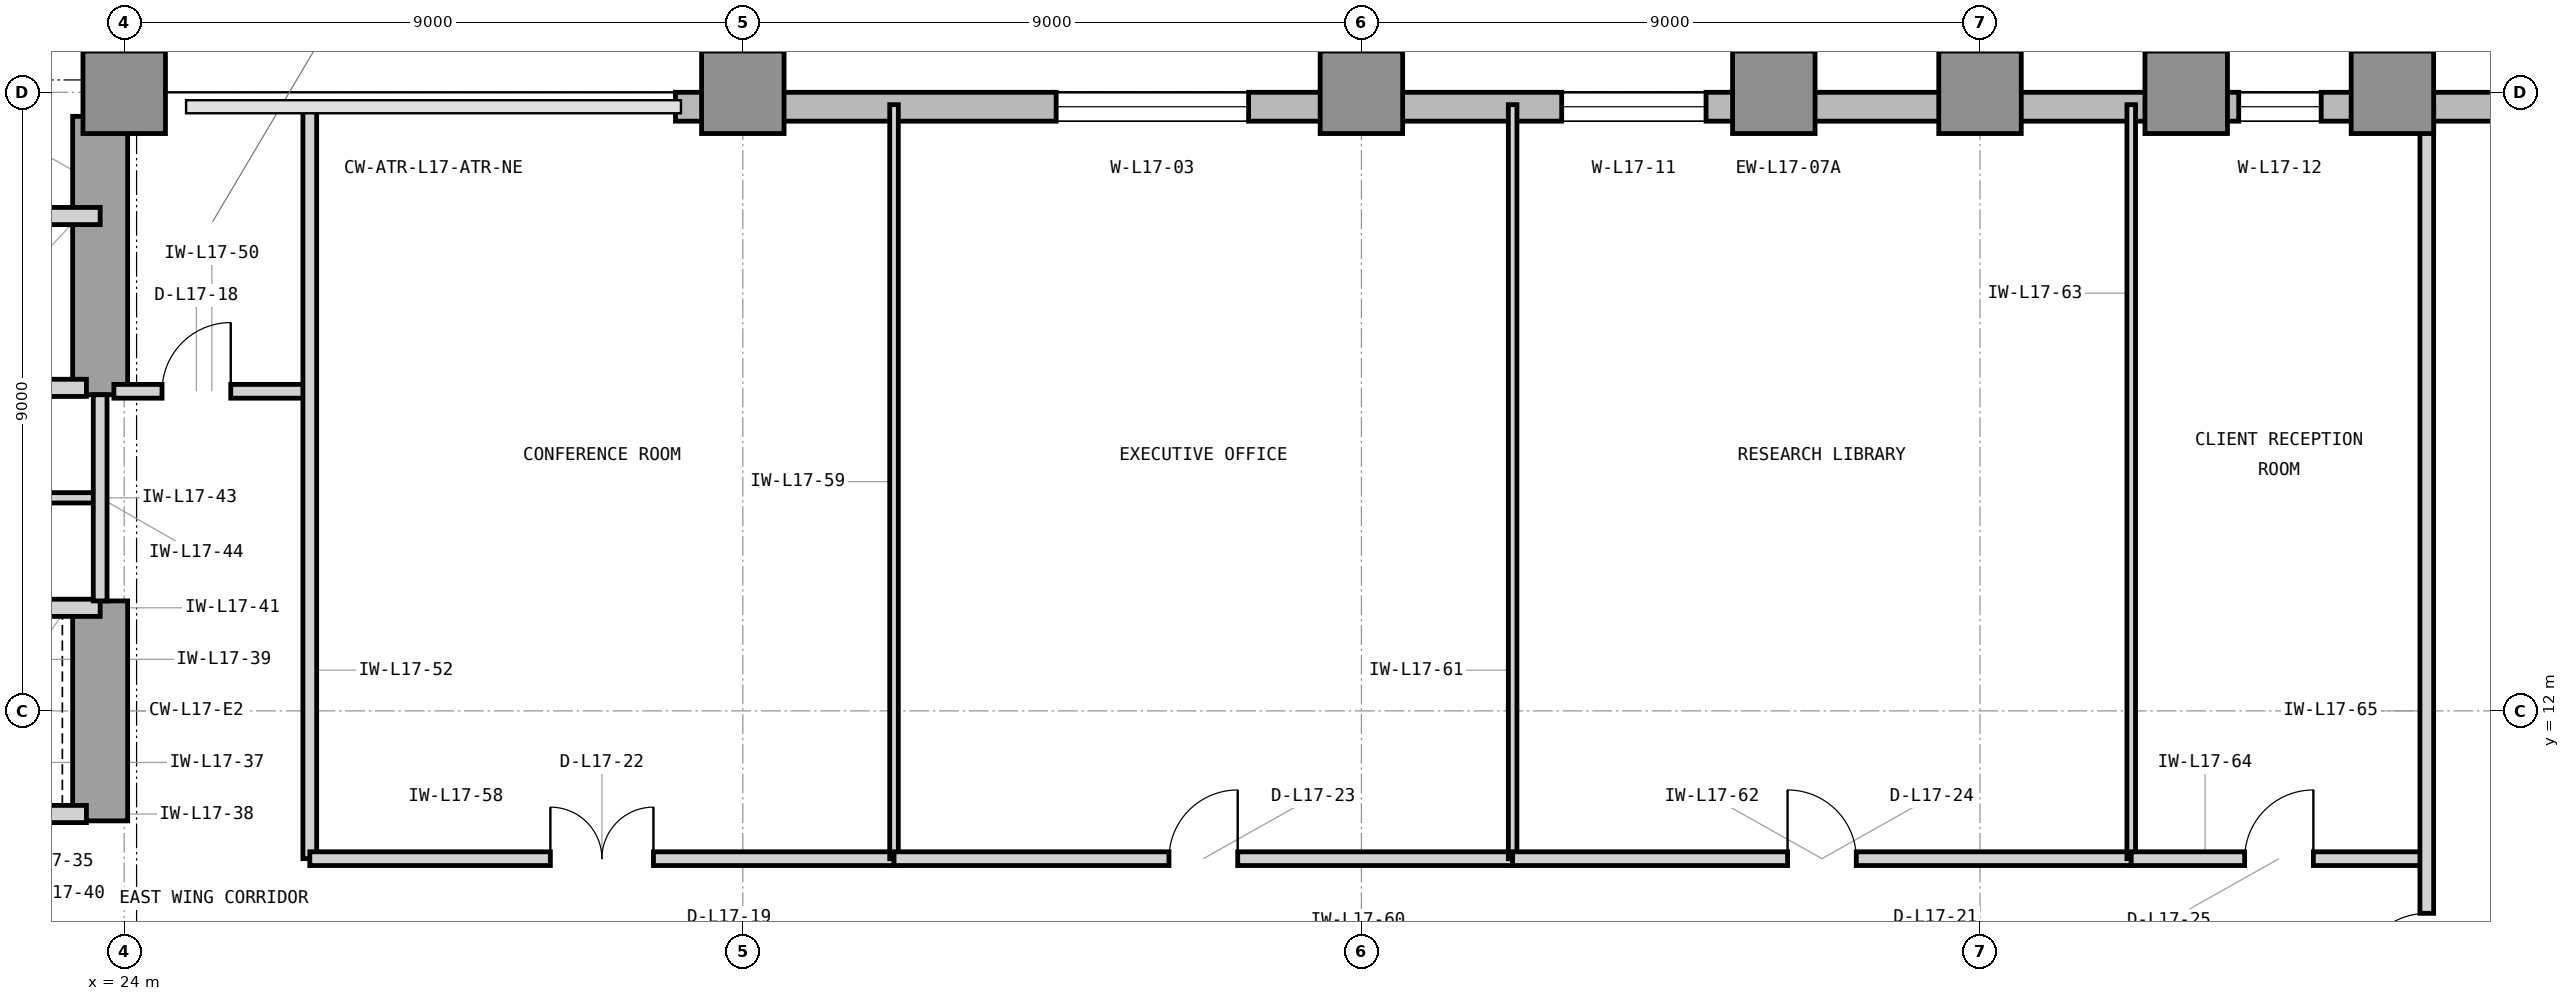
"""IFC4 building model, lengths in metres.
Left out: names, types, materials, properties, quantities, classifications, styles, units other than length and angle.
Written with IfcOpenShell. Run it as: python <this file> out.ifc"""

import sys

from ifc_helpers import new_model, si_unit, direction, frame, frame_2d, origin, origin_2d, place, context, subcontext, project, spatial, rectangle, extrude, element, fill, save


model = new_model("IFC4")
c1 = context("Model", 3, precision=1e-05, world=origin(), true_north=direction((0.0, 1.0)))
c2 = subcontext(c1, "Body", "Model", "MODEL_VIEW")
j1 = project(units=[si_unit("LENGTHUNIT", "METRE"), si_unit("PLANEANGLEUNIT", "RADIAN")], contexts=[c1])
p1 = place(None, origin())
s1 = spatial("IfcSite", under=j1, at=p1, CompositionType="ELEMENT")
p2 = place(p1, origin())
s2 = spatial("IfcBuilding", under=s1, at=p2, CompositionType="ELEMENT")
p3 = place(p2, frame((0.0, 0.0, 76.2)))
s3 = spatial("IfcBuildingStorey", under=s2, at=p3, CompositionType="ELEMENT", Elevation=76.2)
p4 = place(p3, frame((23.65, 10.4, 0.0), z_axis=(0.0, 0.0, 1.0), x_axis=(0.0, 1.0, 0.0)))
e1 = element("IfcWall", 1, at=p4, inside=s3, PredefinedType="SHEAR", context=c2, shape_type="SweptSolid", body=[
    extrude(rectangle(XDim=3.2, YDim=0.8, at=frame_2d((1.6, 0.0))), origin(), (0.0, 0.0, 1.0), 4.2),
])
p5 = place(p3, frame((23.65, 16.6, 0.0), z_axis=(0.0, 0.0, 1.0), x_axis=(0.0, 1.0, 0.0)))
e2 = element("IfcWall", 2, at=p5, inside=s3, PredefinedType="SHEAR", context=c2, shape_type="SweptSolid", body=[
    extrude(rectangle(XDim=4.05, YDim=0.8, at=frame_2d((2.025, 0.0))), origin(), (0.0, 0.0, 1.0), 4.2),
])
for number, where, z_axis, x_axis in (
    (3, (24.0, 21.0, 0.0), (0.0, 0.0, 1.0), (1.0, 0.0, 0.0)),
    (4, (33.0, 21.0, 0.0), (0.0, 0.0, 1.0), (1.0, 0.0, 0.0)),
    (5, (42.0, 21.0, 0.0), (0.0, 0.0, 1.0), (1.0, 0.0, 0.0)),
    (6, (48.0, 21.0, 0.0), (0.0, 0.0, 1.0), (1.0, 0.0, 0.0)),
    (7, (51.0, 21.0, 0.0), (0.0, 0.0, 1.0), (1.0, 0.0, 0.0)),
    (8, (54.0, 21.0, 0.0), (0.0, 0.0, 1.0), (1.0, 0.0, 0.0)),
    (9, (57.0, 21.0, 0.0), (0.0, 0.0, 1.0), (1.0, 0.0, 0.0)),
):
    element("IfcColumn", number, at=place(p3, frame(where, z_axis=z_axis, x_axis=x_axis)), inside=s3, PredefinedType="COLUMN", context=c2, shape_type="SweptSolid", body=[
        extrude(rectangle(XDim=1.2, YDim=1.2, at=origin_2d()), origin(), (0.0, 0.0, 1.0), 4.2),
    ])
p6 = place(p3, frame((64.4, 20.79, 0.0), z_axis=(0.0, 0.0, 1.0), x_axis=(-1.0, 0.0, 0.0)))
e10 = element("IfcWall", 10, at=p6, inside=s3, PredefinedType="STANDARD", context=c2, shape_type="SweptSolid", body=[
    extrude(rectangle(XDim=32.38, YDim=0.42, at=frame_2d((16.19, 0.0))), origin(), (0.0, 0.0, 1.0), 3.98),
])
p7 = place(p6, frame((24.042, 0.0, 0.85)))
e11 = element("IfcOpeningElement", 11, at=p7, cuts=e10, PredefinedType="OPENING", context=c2, shape_type="SweptSolid", body=[
    extrude(rectangle(XDim=2.8, YDim=2.45, at=frame_2d((1.4, 1.225))), frame((0.0, 0.22, 0.0), z_axis=(0.0, -1.0, 0.0), x_axis=(1.0, 0.0, 0.0)), (0.0, 0.0, 1.0), 0.44),
])
p8 = place(p6, frame((17.386, 0.0, 0.85)))
e12 = element("IfcOpeningElement", 12, at=p8, cuts=e10, PredefinedType="OPENING", context=c2, shape_type="SweptSolid", body=[
    extrude(rectangle(XDim=2.1, YDim=2.45, at=frame_2d((1.05, 1.225))), frame((0.0, 0.22, 0.0), z_axis=(0.0, -1.0, 0.0), x_axis=(1.0, 0.0, 0.0)), (0.0, 0.0, 1.0), 0.44),
])
p9 = place(p6, frame((8.436, 0.0, 0.85)))
e13 = element("IfcOpeningElement", 13, at=p9, cuts=e10, PredefinedType="OPENING", context=c2, shape_type="SweptSolid", body=[
    extrude(rectangle(XDim=1.2, YDim=2.45, at=frame_2d((0.6, 1.225))), frame((0.0, 0.22, 0.0), z_axis=(0.0, -1.0, 0.0), x_axis=(1.0, 0.0, 0.0)), (0.0, 0.0, 1.0), 0.44),
])
p10 = place(p3, frame((23.79, 21.0, 0.0), z_axis=(0.0, 0.0, 1.0), x_axis=(0.0, 1.0, 0.0)))
e14 = element("IfcWall", 14, at=p10, inside=s3, PredefinedType="STANDARD", context=c2, shape_type="SweptSolid", body=[
    extrude(rectangle(XDim=28.4, YDim=0.42, at=frame_2d((14.2, 0.0))), origin(), (0.0, 0.0, 1.0), 3.98),
])
p11 = place(p10, frame((10.433, 0.0, 0.85)))
e15 = element("IfcOpeningElement", 15, at=p11, cuts=e14, PredefinedType="OPENING", context=c2, shape_type="SweptSolid", body=[
    extrude(rectangle(XDim=2.8, YDim=2.45, at=frame_2d((1.4, 1.225))), frame((0.0, 0.22, 0.0), z_axis=(0.0, -1.0, 0.0), x_axis=(1.0, 0.0, 0.0)), (0.0, 0.0, 1.0), 0.44),
])
p12 = place(p10, frame((21.966, 0.0, 0.85)))
e16 = element("IfcOpeningElement", 16, at=p12, cuts=e14, PredefinedType="OPENING", context=c2, shape_type="SweptSolid", body=[
    extrude(rectangle(XDim=1.2, YDim=2.45, at=frame_2d((0.6, 1.225))), frame((0.0, 0.22, 0.0), z_axis=(0.0, -1.0, 0.0), x_axis=(1.0, 0.0, 0.0)), (0.0, 0.0, 1.0), 0.44),
])
p13 = place(p3, frame((21.05, 16.7, 0.0), z_axis=(0.0, 0.0, 1.0), x_axis=(1.0, 0.0, 0.0)))
e17 = element("IfcWall", 17, at=p13, inside=s3, PredefinedType="PARTITIONING", context=c2, shape_type="SweptSolid", body=[
    extrude(rectangle(XDim=2.4, YDim=0.25, at=frame_2d((1.2, 0.0))), origin(), (0.0, 0.0, 1.0), 3.426),
])
p14 = place(p3, frame((16.45, 19.2, 0.0), z_axis=(0.0, 0.0, 1.0), x_axis=(1.0, 0.0, 0.0)))
e18 = element("IfcWall", 18, at=p14, inside=s3, PredefinedType="PARTITIONING", context=c2, shape_type="SweptSolid", body=[
    extrude(rectangle(XDim=7.2, YDim=0.25, at=frame_2d((3.6, 0.0))), origin(), (0.0, 0.0, 1.0), 3.97),
])
p15 = place(p3, frame((21.05, 10.5, 0.0), z_axis=(0.0, 0.0, 1.0), x_axis=(1.0, 0.0, 0.0)))
e19 = element("IfcWall", 19, at=p15, inside=s3, PredefinedType="PARTITIONING", context=c2, shape_type="SweptSolid", body=[
    extrude(rectangle(XDim=2.4, YDim=0.25, at=frame_2d((1.2, 0.0))), origin(), (0.0, 0.0, 1.0), 3.426),
])
p16 = place(p3, frame((14.7, 13.5, 0.0), z_axis=(0.0, 0.0, 1.0), x_axis=(1.0, 0.0, 0.0)))
e20 = element("IfcWall", 20, at=p16, inside=s3, PredefinedType="PARTITIONING", context=c2, shape_type="SweptSolid", body=[
    extrude(rectangle(XDim=8.95, YDim=0.25, at=frame_2d((4.475, 0.0))), origin(), (0.0, 0.0, 1.0), 3.426),
])
p17 = place(p3, frame((18.45, 15.1, 0.0), z_axis=(0.0, 0.0, 1.0), x_axis=(1.0, 0.0, 0.0)))
e21 = element("IfcWall", 21, at=p17, inside=s3, PredefinedType="PARTITIONING", context=c2, shape_type="SweptSolid", body=[
    extrude(rectangle(XDim=5.2, YDim=0.15, at=frame_2d((2.6, 0.0))), origin(), (0.0, 0.0, 1.0), 3.97),
])
p18 = place(p3, frame((23.65, 13.6, 0.0), z_axis=(0.0, 0.0, 1.0), x_axis=(0.0, 1.0, 0.0)))
e22 = element("IfcWall", 22, at=p18, inside=s3, PredefinedType="PARTITIONING", context=c2, shape_type="SweptSolid", body=[
    extrude(rectangle(XDim=3.0, YDim=0.2, at=frame_2d((1.5, 0.0))), origin(), (0.0, 0.0, 1.0), 3.97),
])
p19 = place(p3, frame((23.85, 16.65, 0.0), z_axis=(0.0, 0.0, 1.0), x_axis=(1.0, 0.0, 0.0)))
e23 = element("IfcWall", 23, at=p19, inside=s3, PredefinedType="PARTITIONING", context=c2, shape_type="SweptSolid", body=[
    extrude(rectangle(XDim=2.85, YDim=0.2, at=frame_2d((1.425, 0.0))), origin(), (0.0, 0.0, 1.0), 3.97),
])
p20 = place(p19, frame((0.7, 0.0, 0.0)))
e24 = element("IfcOpeningElement", 24, at=p20, cuts=e23, PredefinedType="OPENING", context=c2, shape_type="SweptSolid", body=[
    extrude(rectangle(XDim=1.0, YDim=2.15, at=frame_2d((0.5, 1.075))), frame((0.0, 0.11, 0.0), z_axis=(0.0, -1.0, 0.0), x_axis=(1.0, 0.0, 0.0)), (0.0, 0.0, 1.0), 0.22),
])
p21 = place(p3, frame((26.7, 9.85, 0.0), z_axis=(0.0, 0.0, 1.0), x_axis=(0.0, 1.0, 0.0)))
e25 = element("IfcWall", 25, at=p21, inside=s3, PredefinedType="PARTITIONING", context=c2, shape_type="SweptSolid", body=[
    extrude(rectangle(XDim=10.97, YDim=0.2, at=frame_2d((5.485, 0.0))), origin(), (0.0, 0.0, 1.0), 3.97),
])
p22 = place(p3, frame((26.7, 9.85, 0.0), z_axis=(0.0, 0.0, 1.0), x_axis=(1.0, 0.0, 0.0)))
e26 = element("IfcWall", 26, at=p22, inside=s3, PredefinedType="PARTITIONING", context=c2, shape_type="SweptSolid", body=[
    extrude(rectangle(XDim=8.5, YDim=0.2, at=frame_2d((4.25, 0.0))), origin(), (0.0, 0.0, 1.0), 3.97),
])
p23 = place(p22, frame((3.5, 0.0, 0.0)))
e27 = element("IfcOpeningElement", 27, at=p23, cuts=e26, PredefinedType="OPENING", context=c2, shape_type="SweptSolid", body=[
    extrude(rectangle(XDim=1.5, YDim=2.3, at=frame_2d((0.75, 1.15))), frame((0.0, 0.11, 0.0), z_axis=(0.0, -1.0, 0.0), x_axis=(1.0, 0.0, 0.0)), (0.0, 0.0, 1.0), 0.22),
])
p24 = place(p3, frame((35.2, 9.85, 0.0), z_axis=(0.0, 0.0, 1.0), x_axis=(0.0, 1.0, 0.0)))
e28 = element("IfcWall", 28, at=p24, inside=s3, PredefinedType="PARTITIONING", context=c2, shape_type="SweptSolid", body=[
    extrude(rectangle(XDim=10.97, YDim=0.125, at=frame_2d((5.485, 0.0))), origin(), (0.0, 0.0, 1.0), 3.97),
])
p25 = place(p3, frame((35.2, 9.85, 0.0), z_axis=(0.0, 0.0, 1.0), x_axis=(1.0, 0.0, 0.0)))
e29 = element("IfcWall", 29, at=p25, inside=s3, PredefinedType="PARTITIONING", context=c2, shape_type="SweptSolid", body=[
    extrude(rectangle(XDim=9.0, YDim=0.2, at=frame_2d((4.5, 0.0))), origin(), (0.0, 0.0, 1.0), 3.97),
])
p26 = place(p25, frame((4.0, 0.0, 0.0)))
e30 = element("IfcOpeningElement", 30, at=p26, cuts=e29, PredefinedType="OPENING", context=c2, shape_type="SweptSolid", body=[
    extrude(rectangle(XDim=1.0, YDim=2.15, at=frame_2d((0.5, 1.075))), frame((0.0, 0.11, 0.0), z_axis=(0.0, -1.0, 0.0), x_axis=(1.0, 0.0, 0.0)), (0.0, 0.0, 1.0), 0.22),
])
p27 = place(p3, frame((44.2, 9.85, 0.0), z_axis=(0.0, 0.0, 1.0), x_axis=(0.0, 1.0, 0.0)))
e31 = element("IfcWall", 31, at=p27, inside=s3, PredefinedType="PARTITIONING", context=c2, shape_type="SweptSolid", body=[
    extrude(rectangle(XDim=10.97, YDim=0.125, at=frame_2d((5.485, 0.0))), origin(), (0.0, 0.0, 1.0), 3.97),
])
p28 = place(p3, frame((44.2, 9.85, 0.0), z_axis=(0.0, 0.0, 1.0), x_axis=(1.0, 0.0, 0.0)))
e32 = element("IfcWall", 32, at=p28, inside=s3, PredefinedType="PARTITIONING", context=c2, shape_type="SweptSolid", body=[
    extrude(rectangle(XDim=9.0, YDim=0.2, at=frame_2d((4.5, 0.0))), origin(), (0.0, 0.0, 1.0), 3.97),
])
p29 = place(p28, frame((4.0, 0.0, 0.0)))
e33 = element("IfcOpeningElement", 33, at=p29, cuts=e32, PredefinedType="OPENING", context=c2, shape_type="SweptSolid", body=[
    extrude(rectangle(XDim=1.0, YDim=2.15, at=frame_2d((0.5, 1.075))), frame((0.0, 0.11, 0.0), z_axis=(0.0, -1.0, 0.0), x_axis=(1.0, 0.0, 0.0)), (0.0, 0.0, 1.0), 0.22),
])
p30 = place(p3, frame((53.2, 9.85, 0.0), z_axis=(0.0, 0.0, 1.0), x_axis=(0.0, 1.0, 0.0)))
e34 = element("IfcWall", 34, at=p30, inside=s3, PredefinedType="PARTITIONING", context=c2, shape_type="SweptSolid", body=[
    extrude(rectangle(XDim=10.97, YDim=0.125, at=frame_2d((5.485, 0.0))), origin(), (0.0, 0.0, 1.0), 3.97),
])
p31 = place(p3, frame((53.2, 9.85, 0.0), z_axis=(0.0, 0.0, 1.0), x_axis=(1.0, 0.0, 0.0)))
e35 = element("IfcWall", 35, at=p31, inside=s3, PredefinedType="PARTITIONING", context=c2, shape_type="SweptSolid", body=[
    extrude(rectangle(XDim=4.3, YDim=0.2, at=frame_2d((2.15, 0.0))), origin(), (0.0, 0.0, 1.0), 3.97),
])
p32 = place(p31, frame((1.65, 0.0, 0.0)))
e36 = element("IfcOpeningElement", 36, at=p32, cuts=e35, PredefinedType="OPENING", context=c2, shape_type="SweptSolid", body=[
    extrude(rectangle(XDim=1.0, YDim=2.15, at=frame_2d((0.5, 1.075))), frame((0.0, 0.11, 0.0), z_axis=(0.0, -1.0, 0.0), x_axis=(1.0, 0.0, 0.0)), (0.0, 0.0, 1.0), 0.22),
])
p33 = place(p3, frame((57.5, 3.18, 0.0), z_axis=(0.0, 0.0, 1.0), x_axis=(0.0, 1.0, 0.0)))
e37 = element("IfcWall", 37, at=p33, inside=s3, PredefinedType="PARTITIONING", context=c2, shape_type="SweptSolid", body=[
    extrude(rectangle(XDim=17.64, YDim=0.2, at=frame_2d((8.82, 0.0))), origin(), (0.0, 0.0, 1.0), 3.97),
])
p34 = place(p33, frame((4.875, 0.0, 0.0)))
e38 = element("IfcOpeningElement", 38, at=p34, cuts=e37, PredefinedType="OPENING", context=c2, shape_type="SweptSolid", body=[
    extrude(rectangle(XDim=1.0, YDim=2.15, at=frame_2d((0.5, 1.075))), frame((0.0, 0.11, 0.0), z_axis=(0.0, -1.0, 0.0), x_axis=(1.0, 0.0, 0.0)), (0.0, 0.0, 1.0), 0.22),
])
p35 = place(p7, origin())
e39 = element("IfcWindow", 39, at=p35, inside=s3, PartitioningType="SINGLE_PANEL", PredefinedType="WINDOW", context=c2, shape_type="SweptSolid", body=[
    extrude(rectangle(XDim=2.8, YDim=2.45, at=frame_2d((1.4, 1.225))), frame((0.0, 0.11, 0.0), z_axis=(0.0, -1.0, 0.0), x_axis=(1.0, 0.0, 0.0)), (0.0, 0.0, 1.0), 0.06),
])
fill(e11, e39)
p36 = place(p20, origin())
e40 = element("IfcDoor", 40, at=p36, inside=s3, OperationType="SINGLE_SWING_RIGHT", PredefinedType="DOOR", context=c2, shape_type="SweptSolid", body=[
    extrude(rectangle(XDim=1.0, YDim=2.15, at=frame_2d((0.5, 1.075))), frame((0.0, 0.025, 0.0), z_axis=(0.0, -1.0, 0.0), x_axis=(1.0, 0.0, 0.0)), (0.0, 0.0, 1.0), 0.05),
])
fill(e24, e40)
p37 = place(p23, origin())
e41 = element("IfcDoor", 41, at=p37, inside=s3, OperationType="DOUBLE_DOOR_SINGLE_SWING", PredefinedType="DOOR", context=c2, shape_type="SweptSolid", body=[
    extrude(rectangle(XDim=1.5, YDim=2.3, at=frame_2d((0.75, 1.15))), frame((0.0, 0.025, 0.0), z_axis=(0.0, -1.0, 0.0), x_axis=(1.0, 0.0, 0.0)), (0.0, 0.0, 1.0), 0.05),
])
fill(e27, e41)
p38 = place(p26, origin())
e42 = element("IfcDoor", 42, at=p38, inside=s3, OperationType="SINGLE_SWING_RIGHT", PredefinedType="DOOR", context=c2, shape_type="SweptSolid", body=[
    extrude(rectangle(XDim=1.0, YDim=2.15, at=frame_2d((0.5, 1.075))), frame((0.0, 0.025, 0.0), z_axis=(0.0, -1.0, 0.0), x_axis=(1.0, 0.0, 0.0)), (0.0, 0.0, 1.0), 0.05),
])
fill(e30, e42)
p39 = place(p29, origin())
e43 = element("IfcDoor", 43, at=p39, inside=s3, OperationType="SINGLE_SWING_LEFT", PredefinedType="DOOR", context=c2, shape_type="SweptSolid", body=[
    extrude(rectangle(XDim=1.0, YDim=2.15, at=frame_2d((0.5, 1.075))), frame((0.0, 0.025, 0.0), z_axis=(0.0, -1.0, 0.0), x_axis=(1.0, 0.0, 0.0)), (0.0, 0.0, 1.0), 0.05),
])
fill(e33, e43)
p40 = place(p32, origin())
e44 = element("IfcDoor", 44, at=p40, inside=s3, OperationType="SINGLE_SWING_RIGHT", PredefinedType="DOOR", context=c2, shape_type="SweptSolid", body=[
    extrude(rectangle(XDim=1.0, YDim=2.15, at=frame_2d((0.5, 1.075))), frame((0.0, 0.025, 0.0), z_axis=(0.0, -1.0, 0.0), x_axis=(1.0, 0.0, 0.0)), (0.0, 0.0, 1.0), 0.05),
])
fill(e36, e44)
p41 = place(p34, origin())
e45 = element("IfcDoor", 45, at=p41, inside=s3, OperationType="SINGLE_SWING_LEFT", PredefinedType="DOOR", context=c2, shape_type="SweptSolid", body=[
    extrude(rectangle(XDim=1.0, YDim=2.15, at=frame_2d((0.5, 1.075))), frame((0.0, 0.025, 0.0), z_axis=(0.0, -1.0, 0.0), x_axis=(1.0, 0.0, 0.0)), (0.0, 0.0, 1.0), 0.05),
])
fill(e38, e45)
p42 = place(p8, origin())
e46 = element("IfcWindow", 46, at=p42, inside=s3, PartitioningType="SINGLE_PANEL", PredefinedType="WINDOW", context=c2, shape_type="SweptSolid", body=[
    extrude(rectangle(XDim=2.1, YDim=2.45, at=frame_2d((1.05, 1.225))), frame((0.0, 0.11, 0.0), z_axis=(0.0, -1.0, 0.0), x_axis=(1.0, 0.0, 0.0)), (0.0, 0.0, 1.0), 0.06),
])
fill(e12, e46)
p43 = place(p9, origin())
e47 = element("IfcWindow", 47, at=p43, inside=s3, PartitioningType="SINGLE_PANEL", PredefinedType="WINDOW", context=c2, shape_type="SweptSolid", body=[
    extrude(rectangle(XDim=1.2, YDim=2.45, at=frame_2d((0.6, 1.225))), frame((0.0, 0.11, 0.0), z_axis=(0.0, -1.0, 0.0), x_axis=(1.0, 0.0, 0.0)), (0.0, 0.0, 1.0), 0.06),
])
fill(e13, e47)
save(model, sys.argv[1])
